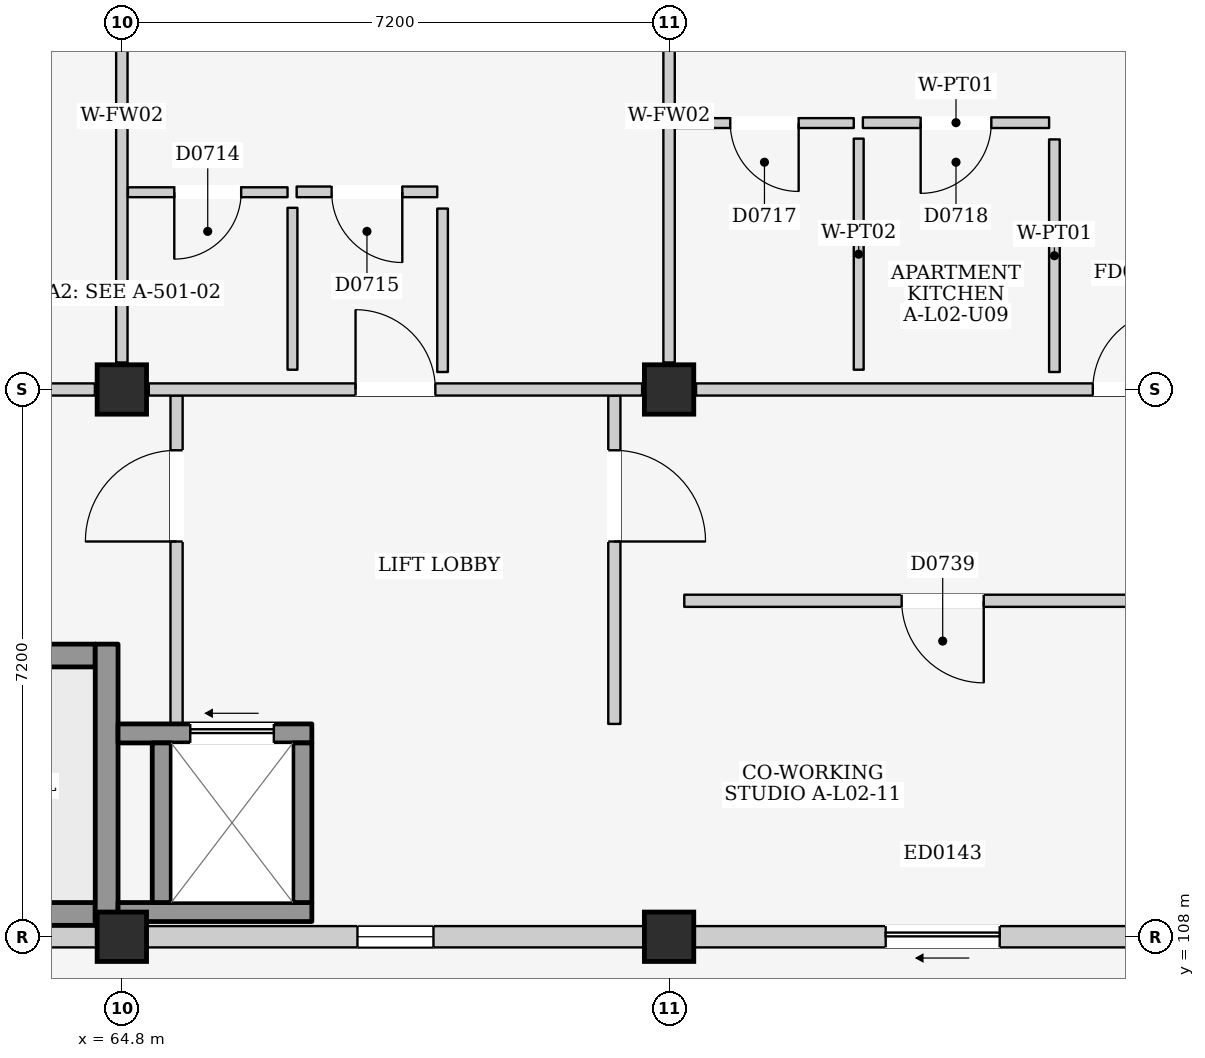
"""IFC4 building model, lengths in metres.
Left out: names, types, materials, properties, quantities, classifications, styles, units other than length and angle.
Written with IfcOpenShell. Run it as: python <this file> out.ifc"""

import sys

from ifc_helpers import new_model, si_unit, direction, frame, frame_2d, origin, origin_2d, place, context, subcontext, project, spatial, rectangle, extrude, element, fill, save


model = new_model("IFC4")
c1 = context("Model", 3, precision=1e-05, world=origin(), true_north=direction((0.0, 1.0)))
c2 = subcontext(c1, "Body", "Model", "MODEL_VIEW")
j1 = project(units=[si_unit("LENGTHUNIT", "METRE"), si_unit("PLANEANGLEUNIT", "RADIAN")], contexts=[c1])
p1 = place(None, origin())
s1 = spatial("IfcSite", under=j1, at=p1, CompositionType="ELEMENT")
p2 = place(p1, origin())
s2 = spatial("IfcBuilding", under=s1, at=p2, CompositionType="ELEMENT")
p3 = place(p2, frame((0.0, 0.0, 9.0)))
s3 = spatial("IfcBuildingStorey", under=s2, at=p3, CompositionType="ELEMENT", Elevation=9.0)
for number, where, z_axis, x_axis in (
    (1, (64.8, 108.0, 0.0), (0.0, 0.0, 1.0), (1.0, 0.0, 0.0)),
    (2, (64.8, 115.2, 0.0), (0.0, 0.0, 1.0), (1.0, 0.0, 0.0)),
    (3, (72.0, 108.0, 0.0), (0.0, 0.0, 1.0), (1.0, 0.0, 0.0)),
    (4, (72.0, 115.2, 0.0), (0.0, 0.0, 1.0), (1.0, 0.0, 0.0)),
):
    element("IfcColumn", number, at=place(p3, frame(where, z_axis=z_axis, x_axis=x_axis)), inside=s3, PredefinedType="COLUMN", context=c2, shape_type="SweptSolid", body=[
        extrude(rectangle(XDim=0.65, YDim=0.65, at=origin_2d()), origin(), (0.0, 0.0, 1.0), 3.2),
    ])
p4 = place(p3, frame((57.925, 108.0, 0.0), z_axis=(0.0, 0.0, 1.0), x_axis=(1.0, 0.0, 0.0)))
e5 = element("IfcWall", 5, at=p4, inside=s3, PredefinedType="ELEMENTEDWALL", context=c2, shape_type="SweptSolid", body=[
    extrude(rectangle(XDim=6.55, YDim=0.28, at=frame_2d((3.275, 0.0))), origin(), (0.0, 0.0, 1.0), 2.295),
])
p5 = place(p4, frame((2.775, 0.0, 1.2)))
e6 = element("IfcOpeningElement", 6, at=p5, cuts=e5, PredefinedType="OPENING", context=c2, shape_type="SweptSolid", body=[
    extrude(rectangle(XDim=1.0, YDim=0.9, at=frame_2d((0.5, 0.45))), frame((0.0, 0.155, 0.0), z_axis=(0.0, -1.0, 0.0), x_axis=(1.0, 0.0, 0.0)), (0.0, 0.0, 1.0), 0.31),
])
p6 = place(p3, frame((65.125, 108.0, 0.0), z_axis=(0.0, 0.0, 1.0), x_axis=(1.0, 0.0, 0.0)))
e7 = element("IfcWall", 7, at=p6, inside=s3, PredefinedType="ELEMENTEDWALL", context=c2, shape_type="SweptSolid", body=[
    extrude(rectangle(XDim=6.55, YDim=0.28, at=frame_2d((3.275, 0.0))), origin(), (0.0, 0.0, 1.0), 2.295),
])
p7 = place(p6, frame((2.775, 0.0, 1.2)))
e8 = element("IfcOpeningElement", 8, at=p7, cuts=e7, PredefinedType="OPENING", context=c2, shape_type="SweptSolid", body=[
    extrude(rectangle(XDim=1.0, YDim=0.9, at=frame_2d((0.5, 0.45))), frame((0.0, 0.155, 0.0), z_axis=(0.0, -1.0, 0.0), x_axis=(1.0, 0.0, 0.0)), (0.0, 0.0, 1.0), 0.31),
])
p8 = place(p3, frame((72.325, 108.0, 0.0), z_axis=(0.0, 0.0, 1.0), x_axis=(1.0, 0.0, 0.0)))
e9 = element("IfcWall", 9, at=p8, inside=s3, PredefinedType="ELEMENTEDWALL", context=c2, shape_type="SweptSolid", body=[
    extrude(rectangle(XDim=6.55, YDim=0.28, at=frame_2d((3.275, 0.0))), origin(), (0.0, 0.0, 1.0), 2.295),
])
p9 = place(p8, frame((2.525, 0.0, 0.0)))
e10 = element("IfcOpeningElement", 10, at=p9, cuts=e9, PredefinedType="OPENING", context=c2, shape_type="SweptSolid", body=[
    extrude(rectangle(XDim=1.5, YDim=2.12, at=frame_2d((0.75, 1.06))), frame((0.0, 0.155, 0.0), z_axis=(0.0, -1.0, 0.0), x_axis=(1.0, 0.0, 0.0)), (0.0, 0.0, 1.0), 0.31),
])
p10 = place(p3, frame((57.95, 108.3, 0.0), z_axis=(0.0, 0.0, 1.0), x_axis=(1.0, 0.0, 0.0)))
e11 = element("IfcWall", 11, at=p10, inside=s3, PredefinedType="SHEAR", context=c2, shape_type="SweptSolid", body=[
    extrude(rectangle(XDim=6.5, YDim=0.3, at=frame_2d((3.25, 0.0))), origin(), (0.0, 0.0, 1.0), 2.96),
])
p11 = place(p3, frame((57.95, 111.7, 0.0), z_axis=(0.0, 0.0, 1.0), x_axis=(1.0, 0.0, 0.0)))
e12 = element("IfcWall", 12, at=p11, inside=s3, PredefinedType="SHEAR", context=c2, shape_type="SweptSolid", body=[
    extrude(rectangle(XDim=6.5, YDim=0.3, at=frame_2d((3.25, 0.0))), origin(), (0.0, 0.0, 1.0), 2.96),
])
p12 = place(p11, frame((0.18, 0.0, 0.0)))
e13 = element("IfcOpeningElement", 13, at=p12, cuts=e12, PredefinedType="OPENING", context=c2, shape_type="SweptSolid", body=[
    extrude(rectangle(XDim=1.15, YDim=2.2, at=frame_2d((0.575, 1.1))), frame((0.0, 0.165, 0.0), z_axis=(0.0, -1.0, 0.0), x_axis=(1.0, 0.0, 0.0)), (0.0, 0.0, 1.0), 0.33),
])
p13 = place(p3, frame((64.6, 108.15, 0.0), z_axis=(0.0, 0.0, 1.0), x_axis=(0.0, 1.0, 0.0)))
e14 = element("IfcWall", 14, at=p13, inside=s3, PredefinedType="SHEAR", context=c2, shape_type="SweptSolid", body=[
    extrude(rectangle(XDim=3.7, YDim=0.3, at=frame_2d((1.85, 0.0))), origin(), (0.0, 0.0, 1.0), 2.96),
])
p14 = place(p3, frame((65.52, 110.8, 0.0), z_axis=(0.0, 0.0, 1.0), x_axis=(0.0, 1.0, 0.0)))
e15 = element("IfcWall", 15, at=p14, inside=s3, PredefinedType="PARTITIONING", context=c2, shape_type="SweptSolid", body=[
    extrude(rectangle(XDim=4.32, YDim=0.16, at=frame_2d((2.16, 0.0))), origin(), (0.0, 0.0, 1.0), 2.96),
])
p15 = place(p14, frame((2.4, 0.0, 0.0)))
e16 = element("IfcOpeningElement", 16, at=p15, cuts=e15, PredefinedType="OPENING", context=c2, shape_type="SweptSolid", body=[
    extrude(rectangle(XDim=1.2, YDim=2.2, at=frame_2d((0.6, 1.1))), frame((0.0, 0.095, 0.0), z_axis=(0.0, -1.0, 0.0), x_axis=(1.0, 0.0, 0.0)), (0.0, 0.0, 1.0), 0.19),
])
p16 = place(p3, frame((71.28, 110.8, 0.0), z_axis=(0.0, 0.0, 1.0), x_axis=(0.0, 1.0, 0.0)))
e17 = element("IfcWall", 17, at=p16, inside=s3, PredefinedType="PARTITIONING", context=c2, shape_type="SweptSolid", body=[
    extrude(rectangle(XDim=4.32, YDim=0.16, at=frame_2d((2.16, 0.0))), origin(), (0.0, 0.0, 1.0), 2.96),
])
p17 = place(p16, frame((2.4, 0.0, 0.0)))
e18 = element("IfcOpeningElement", 18, at=p17, cuts=e17, PredefinedType="OPENING", context=c2, shape_type="SweptSolid", body=[
    extrude(rectangle(XDim=1.2, YDim=2.2, at=frame_2d((0.6, 1.1))), frame((0.0, 0.095, 0.0), z_axis=(0.0, -1.0, 0.0), x_axis=(1.0, 0.0, 0.0)), (0.0, 0.0, 1.0), 0.19),
])
p18 = place(p3, frame((64.75, 108.325, 0.0), z_axis=(0.0, 0.0, 1.0), x_axis=(1.0, 0.0, 0.0)))
e19 = element("IfcWall", 19, at=p18, inside=s3, PredefinedType="SHEAR", context=c2, shape_type="SweptSolid", body=[
    extrude(rectangle(XDim=2.55, YDim=0.25, at=frame_2d((1.275, 0.0))), origin(), (0.0, 0.0, 1.0), 2.96),
])
p19 = place(p3, frame((64.75, 110.675, 0.0), z_axis=(0.0, 0.0, 1.0), x_axis=(1.0, 0.0, 0.0)))
e20 = element("IfcWall", 20, at=p19, inside=s3, PredefinedType="SHEAR", context=c2, shape_type="SweptSolid", body=[
    extrude(rectangle(XDim=2.55, YDim=0.25, at=frame_2d((1.275, 0.0))), origin(), (0.0, 0.0, 1.0), 2.96),
])
p20 = place(p19, frame((0.95, 0.0, 0.0)))
e21 = element("IfcOpeningElement", 21, at=p20, cuts=e20, PredefinedType="OPENING", context=c2, shape_type="SweptSolid", body=[
    extrude(rectangle(XDim=1.1, YDim=2.15, at=frame_2d((0.55, 1.075))), frame((0.0, 0.14, 0.0), z_axis=(0.0, -1.0, 0.0), x_axis=(1.0, 0.0, 0.0)), (0.0, 0.0, 1.0), 0.28),
])
for number, where, z_axis, x_axis in (
    (22, (65.325, 108.45, 0.0), (0.0, 0.0, 1.0), (0.0, 1.0, 0.0)),
    (23, (67.175, 108.45, 0.0), (0.0, 0.0, 1.0), (0.0, 1.0, 0.0)),
):
    element("IfcWall", number, at=place(p3, frame(where, z_axis=z_axis, x_axis=x_axis)), inside=s3, PredefinedType="SHEAR", context=c2, shape_type="SweptSolid", body=[
        extrude(rectangle(XDim=2.1, YDim=0.25, at=frame_2d((1.05, 0.0))), origin(), (0.0, 0.0, 1.0), 2.96),
    ])
p21 = place(p3, frame((57.955, 115.2, 0.0), z_axis=(0.0, 0.0, 1.0), x_axis=(1.0, 0.0, 0.0)))
e24 = element("IfcWall", 24, at=p21, inside=s3, PredefinedType="PARTITIONING", context=c2, shape_type="SweptSolid", body=[
    extrude(rectangle(XDim=6.49, YDim=0.16, at=frame_2d((3.245, 0.0))), origin(), (0.0, 0.0, 1.0), 2.295),
])
p22 = place(p21, frame((2.72, 0.0, 0.0)))
e25 = element("IfcOpeningElement", 25, at=p22, cuts=e24, PredefinedType="OPENING", context=c2, shape_type="SweptSolid", body=[
    extrude(rectangle(XDim=1.05, YDim=2.15, at=frame_2d((0.525, 1.075))), frame((0.0, 0.095, 0.0), z_axis=(0.0, -1.0, 0.0), x_axis=(1.0, 0.0, 0.0)), (0.0, 0.0, 1.0), 0.19),
])
p23 = place(p3, frame((64.8, 115.555, 0.0), z_axis=(0.0, 0.0, 1.0), x_axis=(0.0, 1.0, 0.0)))
e26 = element("IfcWall", 26, at=p23, inside=s3, PredefinedType="PARTITIONING", context=c2, shape_type="SweptSolid", body=[
    extrude(rectangle(XDim=6.49, YDim=0.15, at=frame_2d((3.245, 0.0))), origin(), (0.0, 0.0, 1.0), 2.395),
])
p24 = place(p3, frame((65.155, 115.2, 0.0), z_axis=(0.0, 0.0, 1.0), x_axis=(1.0, 0.0, 0.0)))
e27 = element("IfcWall", 27, at=p24, inside=s3, PredefinedType="PARTITIONING", context=c2, shape_type="SweptSolid", body=[
    extrude(rectangle(XDim=6.49, YDim=0.16, at=frame_2d((3.245, 0.0))), origin(), (0.0, 0.0, 1.0), 2.295),
])
p25 = place(p24, frame((2.72, 0.0, 0.0)))
e28 = element("IfcOpeningElement", 28, at=p25, cuts=e27, PredefinedType="OPENING", context=c2, shape_type="SweptSolid", body=[
    extrude(rectangle(XDim=1.05, YDim=2.15, at=frame_2d((0.525, 1.075))), frame((0.0, 0.095, 0.0), z_axis=(0.0, -1.0, 0.0), x_axis=(1.0, 0.0, 0.0)), (0.0, 0.0, 1.0), 0.19),
])
p26 = place(p3, frame((72.0, 115.555, 0.0), z_axis=(0.0, 0.0, 1.0), x_axis=(0.0, 1.0, 0.0)))
e29 = element("IfcWall", 29, at=p26, inside=s3, PredefinedType="PARTITIONING", context=c2, shape_type="SweptSolid", body=[
    extrude(rectangle(XDim=6.49, YDim=0.15, at=frame_2d((3.245, 0.0))), origin(), (0.0, 0.0, 1.0), 2.395),
])
p27 = place(p3, frame((64.88, 117.795, 0.0), z_axis=(0.0, 0.0, 1.0), x_axis=(1.0, 0.0, 0.0)))
e30 = element("IfcWall", 30, at=p27, inside=s3, PredefinedType="PARTITIONING", context=c2, shape_type="SweptSolid", body=[
    extrude(rectangle(XDim=2.1, YDim=0.13, at=frame_2d((1.05, 0.0))), origin(), (0.0, 0.0, 1.0), 2.96),
])
p28 = place(p27, frame((0.61, 0.0, 0.0)))
e31 = element("IfcOpeningElement", 31, at=p28, cuts=e30, PredefinedType="OPENING", context=c2, shape_type="SweptSolid", body=[
    extrude(rectangle(XDim=0.88, YDim=2.1, at=frame_2d((0.44, 1.05))), frame((0.0, 0.08, 0.0), z_axis=(0.0, -1.0, 0.0), x_axis=(1.0, 0.0, 0.0)), (0.0, 0.0, 1.0), 0.16),
])
p29 = place(p3, frame((67.045, 115.46, 0.0), z_axis=(0.0, 0.0, 1.0), x_axis=(0.0, 1.0, 0.0)))
e32 = element("IfcWall", 32, at=p29, inside=s3, PredefinedType="PARTITIONING", context=c2, shape_type="SweptSolid", body=[
    extrude(rectangle(XDim=2.13, YDim=0.13, at=frame_2d((1.065, 0.0))), origin(), (0.0, 0.0, 1.0), 2.96),
])
p30 = place(p3, frame((67.1, 117.8, 0.0), z_axis=(0.0, 0.0, 1.0), x_axis=(1.0, 0.0, 0.0)))
e33 = element("IfcWall", 33, at=p30, inside=s3, PredefinedType="PARTITIONING", context=c2, shape_type="SweptSolid", body=[
    extrude(rectangle(XDim=1.85, YDim=0.14, at=frame_2d((0.925, 0.0))), origin(), (0.0, 0.0, 1.0), 2.96),
])
p31 = place(p30, frame((0.46, 0.0, 0.0)))
e34 = element("IfcOpeningElement", 34, at=p31, cuts=e33, PredefinedType="OPENING", context=c2, shape_type="SweptSolid", body=[
    extrude(rectangle(XDim=0.93, YDim=2.14, at=frame_2d((0.465, 1.07))), frame((0.0, 0.085, 0.0), z_axis=(0.0, -1.0, 0.0), x_axis=(1.0, 0.0, 0.0)), (0.0, 0.0, 1.0), 0.17),
])
p32 = place(p3, frame((69.02, 115.43, 0.0), z_axis=(0.0, 0.0, 1.0), x_axis=(0.0, 1.0, 0.0)))
e35 = element("IfcWall", 35, at=p32, inside=s3, PredefinedType="PARTITIONING", context=c2, shape_type="SweptSolid", body=[
    extrude(rectangle(XDim=2.15, YDim=0.14, at=frame_2d((1.075, 0.0))), origin(), (0.0, 0.0, 1.0), 2.96),
])
p33 = place(p3, frame((72.355, 115.2, 0.0), z_axis=(0.0, 0.0, 1.0), x_axis=(1.0, 0.0, 0.0)))
e36 = element("IfcWall", 36, at=p33, inside=s3, PredefinedType="PARTITIONING", context=c2, shape_type="SweptSolid", body=[
    extrude(rectangle(XDim=6.49, YDim=0.16, at=frame_2d((3.245, 0.0))), origin(), (0.0, 0.0, 1.0), 2.295),
])
p34 = place(p33, frame((5.22, 0.0, 0.0)))
e37 = element("IfcOpeningElement", 37, at=p34, cuts=e36, PredefinedType="OPENING", context=c2, shape_type="SweptSolid", body=[
    extrude(rectangle(XDim=1.05, YDim=2.15, at=frame_2d((0.525, 1.075))), frame((0.0, 0.095, 0.0), z_axis=(0.0, -1.0, 0.0), x_axis=(1.0, 0.0, 0.0)), (0.0, 0.0, 1.0), 0.19),
])
p35 = place(p3, frame((72.08, 118.705, 0.0), z_axis=(0.0, 0.0, 1.0), x_axis=(1.0, 0.0, 0.0)))
e38 = element("IfcWall", 38, at=p35, inside=s3, PredefinedType="PARTITIONING", context=c2, shape_type="SweptSolid", body=[
    extrude(rectangle(XDim=2.35, YDim=0.13, at=frame_2d((1.175, 0.0))), origin(), (0.0, 0.0, 1.0), 2.96),
])
p36 = place(p35, frame((0.725, 0.0, 0.0)))
e39 = element("IfcOpeningElement", 39, at=p36, cuts=e38, PredefinedType="OPENING", context=c2, shape_type="SweptSolid", body=[
    extrude(rectangle(XDim=0.9, YDim=2.1, at=frame_2d((0.45, 1.05))), frame((0.0, 0.08, 0.0), z_axis=(0.0, -1.0, 0.0), x_axis=(1.0, 0.0, 0.0)), (0.0, 0.0, 1.0), 0.16),
])
p37 = place(p3, frame((74.495, 115.46, 0.0), z_axis=(0.0, 0.0, 1.0), x_axis=(0.0, 1.0, 0.0)))
e40 = element("IfcWall", 40, at=p37, inside=s3, PredefinedType="PARTITIONING", context=c2, shape_type="SweptSolid", body=[
    extrude(rectangle(XDim=3.04, YDim=0.13, at=frame_2d((1.52, 0.0))), origin(), (0.0, 0.0, 1.0), 2.96),
])
p38 = place(p3, frame((74.55, 118.71, 0.0), z_axis=(0.0, 0.0, 1.0), x_axis=(1.0, 0.0, 0.0)))
e41 = element("IfcWall", 41, at=p38, inside=s3, PredefinedType="PARTITIONING", context=c2, shape_type="SweptSolid", body=[
    extrude(rectangle(XDim=2.45, YDim=0.14, at=frame_2d((1.225, 0.0))), origin(), (0.0, 0.0, 1.0), 2.96),
])
p39 = place(p38, frame((0.76, 0.0, 0.0)))
e42 = element("IfcOpeningElement", 42, at=p39, cuts=e41, PredefinedType="OPENING", context=c2, shape_type="SweptSolid", body=[
    extrude(rectangle(XDim=0.93, YDim=2.14, at=frame_2d((0.465, 1.07))), frame((0.0, 0.085, 0.0), z_axis=(0.0, -1.0, 0.0), x_axis=(1.0, 0.0, 0.0)), (0.0, 0.0, 1.0), 0.17),
])
p40 = place(p3, frame((77.07, 115.43, 0.0), z_axis=(0.0, 0.0, 1.0), x_axis=(0.0, 1.0, 0.0)))
e43 = element("IfcWall", 43, at=p40, inside=s3, PredefinedType="PARTITIONING", context=c2, shape_type="SweptSolid", body=[
    extrude(rectangle(XDim=3.06, YDim=0.14, at=frame_2d((1.53, 0.0))), origin(), (0.0, 0.0, 1.0), 2.96),
])
p41 = place(p3, frame((72.2, 112.42, 0.0), z_axis=(0.0, 0.0, 1.0), x_axis=(1.0, 0.0, 0.0)))
e44 = element("IfcWall", 44, at=p41, inside=s3, PredefinedType="PARTITIONING", context=c2, shape_type="SweptSolid", body=[
    extrude(rectangle(XDim=6.8, YDim=0.16, at=frame_2d((3.4, 0.0))), origin(), (0.0, 0.0, 1.0), 2.96),
])
p42 = place(p41, frame((2.86, 0.0, 0.0)))
e45 = element("IfcOpeningElement", 45, at=p42, cuts=e44, PredefinedType="OPENING", context=c2, shape_type="SweptSolid", body=[
    extrude(rectangle(XDim=1.08, YDim=2.22, at=frame_2d((0.54, 1.11))), frame((0.0, 0.095, 0.0), z_axis=(0.0, -1.0, 0.0), x_axis=(1.0, 0.0, 0.0)), (0.0, 0.0, 1.0), 0.19),
])
p43 = place(p7, origin())
e46 = element("IfcWindow", 46, at=p43, inside=s3, PartitioningType="SINGLE_PANEL", PredefinedType="WINDOW", context=c2, shape_type="SweptSolid", body=[
    extrude(rectangle(XDim=1.0, YDim=0.9, at=frame_2d((0.5, 0.45))), frame((0.0, 0.03, 0.0), z_axis=(0.0, -1.0, 0.0), x_axis=(1.0, 0.0, 0.0)), (0.0, 0.0, 1.0), 0.06),
])
fill(e8, e46)
p44 = place(p9, frame((1.5, 0.0, 0.0), z_axis=(0.0, 0.0, 1.0), x_axis=(-1.0, 0.0, 0.0)))
e47 = element("IfcDoor", 47, at=p44, inside=s3, OperationType="SLIDING_TO_LEFT", PredefinedType="DOOR", context=c2, shape_type="SweptSolid", body=[
    extrude(rectangle(XDim=1.5, YDim=2.12, at=frame_2d((0.75, 1.06))), frame((0.0, 0.025, 0.0), z_axis=(0.0, -1.0, 0.0), x_axis=(1.0, 0.0, 0.0)), (0.0, 0.0, 1.0), 0.05),
])
fill(e10, e47)
p45 = place(p15, origin())
e48 = element("IfcDoor", 48, at=p45, inside=s3, OperationType="SINGLE_SWING_LEFT", PredefinedType="DOOR", context=c2, shape_type="SweptSolid", body=[
    extrude(rectangle(XDim=1.2, YDim=2.2, at=frame_2d((0.6, 1.1))), frame((0.0, 0.025, 0.0), z_axis=(0.0, -1.0, 0.0), x_axis=(1.0, 0.0, 0.0)), (0.0, 0.0, 1.0), 0.05),
])
fill(e16, e48)
p46 = place(p17, frame((1.2, 0.0, 0.0), z_axis=(0.0, 0.0, 1.0), x_axis=(-1.0, 0.0, 0.0)))
e49 = element("IfcDoor", 49, at=p46, inside=s3, OperationType="SINGLE_SWING_RIGHT", PredefinedType="DOOR", context=c2, shape_type="SweptSolid", body=[
    extrude(rectangle(XDim=1.2, YDim=2.2, at=frame_2d((0.6, 1.1))), frame((0.0, 0.025, 0.0), z_axis=(0.0, -1.0, 0.0), x_axis=(1.0, 0.0, 0.0)), (0.0, 0.0, 1.0), 0.05),
])
fill(e18, e49)
p47 = place(p20, origin())
e50 = element("IfcDoor", 50, at=p47, inside=s3, OperationType="SLIDING_TO_LEFT", PredefinedType="DOOR", context=c2, shape_type="SweptSolid", body=[
    extrude(rectangle(XDim=1.1, YDim=2.15, at=frame_2d((0.55, 1.075))), frame((0.0, 0.025, 0.0), z_axis=(0.0, -1.0, 0.0), x_axis=(1.0, 0.0, 0.0)), (0.0, 0.0, 1.0), 0.05),
])
fill(e21, e50)
p48 = place(p25, origin())
e51 = element("IfcDoor", 51, at=p48, inside=s3, OperationType="SINGLE_SWING_LEFT", PredefinedType="DOOR", context=c2, shape_type="SweptSolid", body=[
    extrude(rectangle(XDim=1.05, YDim=2.15, at=frame_2d((0.525, 1.075))), frame((0.0, 0.025, 0.0), z_axis=(0.0, -1.0, 0.0), x_axis=(1.0, 0.0, 0.0)), (0.0, 0.0, 1.0), 0.05),
])
fill(e28, e51)
p49 = place(p28, frame((0.88, 0.0, 0.0), z_axis=(0.0, 0.0, 1.0), x_axis=(-1.0, 0.0, 0.0)))
e52 = element("IfcDoor", 52, at=p49, inside=s3, OperationType="SINGLE_SWING_RIGHT", PredefinedType="DOOR", context=c2, shape_type="SweptSolid", body=[
    extrude(rectangle(XDim=0.88, YDim=2.1, at=frame_2d((0.44, 1.05))), frame((0.0, 0.025, 0.0), z_axis=(0.0, -1.0, 0.0), x_axis=(1.0, 0.0, 0.0)), (0.0, 0.0, 1.0), 0.05),
])
fill(e31, e52)
p50 = place(p31, frame((0.93, 0.0, 0.0), z_axis=(0.0, 0.0, 1.0), x_axis=(-1.0, 0.0, 0.0)))
e53 = element("IfcDoor", 53, at=p50, inside=s3, OperationType="SINGLE_SWING_LEFT", PredefinedType="DOOR", context=c2, shape_type="SweptSolid", body=[
    extrude(rectangle(XDim=0.93, YDim=2.14, at=frame_2d((0.465, 1.07))), frame((0.0, 0.025, 0.0), z_axis=(0.0, -1.0, 0.0), x_axis=(1.0, 0.0, 0.0)), (0.0, 0.0, 1.0), 0.05),
])
fill(e34, e53)
p51 = place(p34, origin())
e54 = element("IfcDoor", 54, at=p51, inside=s3, OperationType="SINGLE_SWING_RIGHT", PredefinedType="DOOR", context=c2, shape_type="SweptSolid", body=[
    extrude(rectangle(XDim=1.05, YDim=2.15, at=frame_2d((0.525, 1.075))), frame((0.0, 0.025, 0.0), z_axis=(0.0, -1.0, 0.0), x_axis=(1.0, 0.0, 0.0)), (0.0, 0.0, 1.0), 0.05),
])
fill(e37, e54)
p52 = place(p36, frame((0.9, 0.0, 0.0), z_axis=(0.0, 0.0, 1.0), x_axis=(-1.0, 0.0, 0.0)))
e55 = element("IfcDoor", 55, at=p52, inside=s3, OperationType="SINGLE_SWING_LEFT", PredefinedType="DOOR", context=c2, shape_type="SweptSolid", body=[
    extrude(rectangle(XDim=0.9, YDim=2.1, at=frame_2d((0.45, 1.05))), frame((0.0, 0.025, 0.0), z_axis=(0.0, -1.0, 0.0), x_axis=(1.0, 0.0, 0.0)), (0.0, 0.0, 1.0), 0.05),
])
fill(e39, e55)
p53 = place(p39, frame((0.93, 0.0, 0.0), z_axis=(0.0, 0.0, 1.0), x_axis=(-1.0, 0.0, 0.0)))
e56 = element("IfcDoor", 56, at=p53, inside=s3, OperationType="SINGLE_SWING_RIGHT", PredefinedType="DOOR", context=c2, shape_type="SweptSolid", body=[
    extrude(rectangle(XDim=0.93, YDim=2.14, at=frame_2d((0.465, 1.07))), frame((0.0, 0.025, 0.0), z_axis=(0.0, -1.0, 0.0), x_axis=(1.0, 0.0, 0.0)), (0.0, 0.0, 1.0), 0.05),
])
fill(e42, e56)
p54 = place(p42, frame((1.08, 0.0, 0.0), z_axis=(0.0, 0.0, 1.0), x_axis=(-1.0, 0.0, 0.0)))
e57 = element("IfcDoor", 57, at=p54, inside=s3, OperationType="SINGLE_SWING_LEFT", PredefinedType="DOOR", context=c2, shape_type="SweptSolid", body=[
    extrude(rectangle(XDim=1.08, YDim=2.22, at=frame_2d((0.54, 1.11))), frame((0.0, 0.025, 0.0), z_axis=(0.0, -1.0, 0.0), x_axis=(1.0, 0.0, 0.0)), (0.0, 0.0, 1.0), 0.05),
])
fill(e45, e57)
save(model, sys.argv[1])
